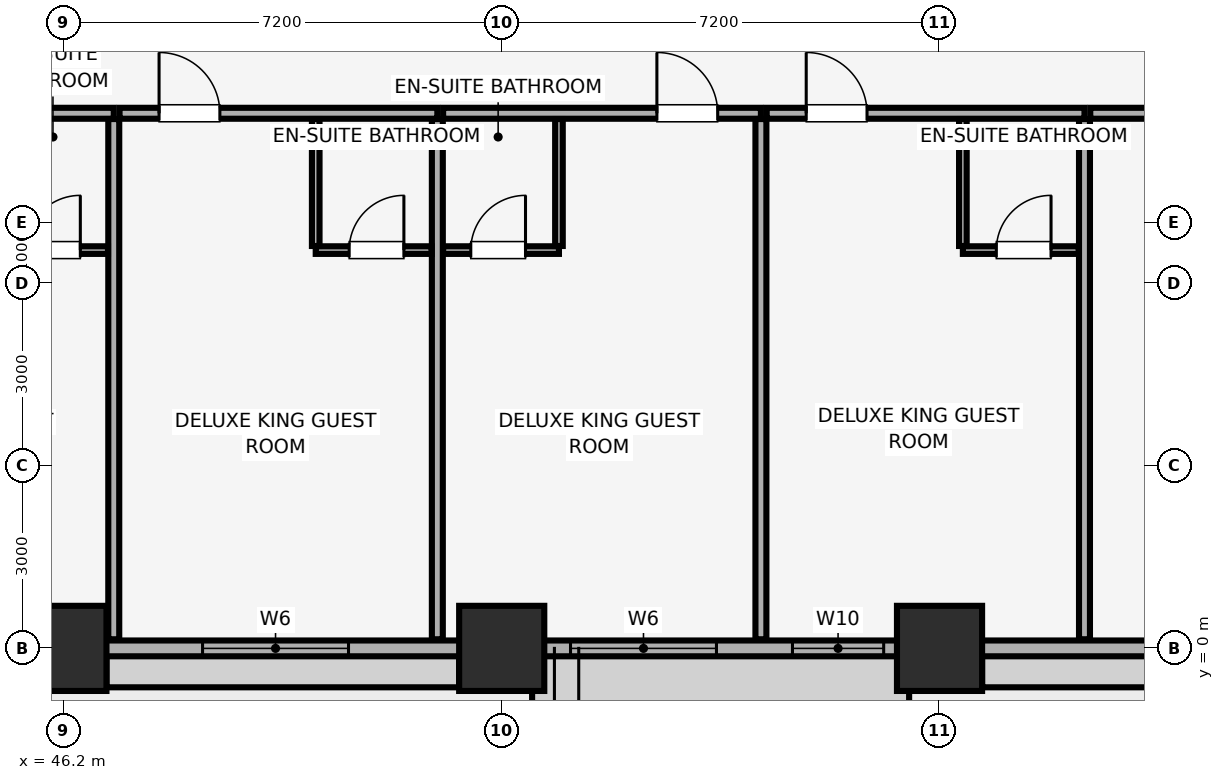
"""IFC4 building model, lengths in metres.
Left out: names, types, materials, properties, quantities, classifications, styles, units other than length and angle.
Written with IfcOpenShell. Run it as: python <this file> out.ifc"""

import sys

from ifc_helpers import new_model, si_unit, direction, frame, frame_2d, origin, origin_2d, place, context, subcontext, project, spatial, rectangle, extrude, element, fill, save


model = new_model("IFC4")
c1 = context("Model", 3, precision=1e-05, world=origin(), true_north=direction((0.0, 1.0)))
c2 = subcontext(c1, "Body", "Model", "MODEL_VIEW")
j1 = project(units=[si_unit("LENGTHUNIT", "METRE"), si_unit("PLANEANGLEUNIT", "RADIAN")], contexts=[c1])
p1 = place(None, origin())
s1 = spatial("IfcSite", under=j1, at=p1, CompositionType="ELEMENT")
p2 = place(p1, origin())
s2 = spatial("IfcBuilding", under=s1, at=p2, CompositionType="ELEMENT")
p3 = place(p2, frame((0.0, 0.0, 31.4)))
s3 = spatial("IfcBuildingStorey", under=s2, at=p3, CompositionType="ELEMENT", Elevation=31.4)
for number, where, z_axis, x_axis in (
    (1, (46.2, 0.0, 0.0), (0.0, 0.0, 1.0), (1.0, 0.0, 0.0)),
    (2, (53.4, 0.0, 0.0), (0.0, 0.0, 1.0), (1.0, 0.0, 0.0)),
    (3, (60.6, 0.0, 0.0), (0.0, 0.0, 1.0), (1.0, 0.0, 0.0)),
):
    element("IfcColumn", number, at=place(p3, frame(where, z_axis=z_axis, x_axis=x_axis)), inside=s3, PredefinedType="COLUMN", context=c2, shape_type="SweptSolid", body=[
        extrude(rectangle(XDim=1.4, YDim=1.4, at=origin_2d()), origin(), (0.0, 0.0, 1.0), 3.51),
    ])
p4 = place(p3, frame((4.2, 0.0, 0.0), z_axis=(0.0, 0.0, 1.0), x_axis=(1.0, 0.0, 0.0)))
e4 = element("IfcWall", 4, at=p4, inside=s3, PredefinedType="SOLIDWALL", context=c2, shape_type="SweptSolid", body=[
    extrude(rectangle(XDim=75.6, YDim=0.26, at=frame_2d((37.8, 0.0))), origin(), (0.0, 0.0, 1.0), 2.56),
])
p5 = place(p4, frame((13.517, 0.0, 0.0)))
e5 = element("IfcOpeningElement", 5, at=p5, cuts=e4, PredefinedType="OPENING", context=c2, shape_type="SweptSolid", body=[
    extrude(rectangle(XDim=1.1, YDim=2.15, at=frame_2d((0.55, 1.075))), frame((0.0, 0.14, 0.0), z_axis=(0.0, -1.0, 0.0), x_axis=(1.0, 0.0, 0.0)), (0.0, 0.0, 1.0), 0.28),
])
p6 = place(p4, frame((28.183, 0.0, 0.0)))
e6 = element("IfcOpeningElement", 6, at=p6, cuts=e4, PredefinedType="OPENING", context=c2, shape_type="SweptSolid", body=[
    extrude(rectangle(XDim=1.1, YDim=2.15, at=frame_2d((0.55, 1.075))), frame((0.0, 0.14, 0.0), z_axis=(0.0, -1.0, 0.0), x_axis=(1.0, 0.0, 0.0)), (0.0, 0.0, 1.0), 0.28),
])
p7 = place(p4, frame((60.983, 0.0, 0.0)))
e7 = element("IfcOpeningElement", 7, at=p7, cuts=e4, PredefinedType="OPENING", context=c2, shape_type="SweptSolid", body=[
    extrude(rectangle(XDim=1.1, YDim=2.15, at=frame_2d((0.55, 1.075))), frame((0.0, 0.14, 0.0), z_axis=(0.0, -1.0, 0.0), x_axis=(1.0, 0.0, 0.0)), (0.0, 0.0, 1.0), 0.28),
])
p8 = place(p4, frame((1.035, 0.0, 0.85)))
e8 = element("IfcOpeningElement", 8, at=p8, cuts=e4, PredefinedType="OPENING", context=c2, shape_type="SweptSolid", body=[
    extrude(rectangle(XDim=2.4, YDim=1.5, at=frame_2d((1.2, 0.75))), frame((0.0, 0.14, 0.0), z_axis=(0.0, -1.0, 0.0), x_axis=(1.0, 0.0, 0.0)), (0.0, 0.0, 1.0), 0.28),
])
p9 = place(p4, frame((7.031, 0.0, 0.85)))
e9 = element("IfcOpeningElement", 9, at=p9, cuts=e4, PredefinedType="OPENING", context=c2, shape_type="SweptSolid", body=[
    extrude(rectangle(XDim=2.4, YDim=1.5, at=frame_2d((1.2, 0.75))), frame((0.0, 0.14, 0.0), z_axis=(0.0, -1.0, 0.0), x_axis=(1.0, 0.0, 0.0)), (0.0, 0.0, 1.0), 0.28),
])
p10 = place(p4, frame((16.757, 0.0, 0.85)))
e10 = element("IfcOpeningElement", 10, at=p10, cuts=e4, PredefinedType="OPENING", context=c2, shape_type="SweptSolid", body=[
    extrude(rectangle(XDim=1.5, YDim=1.4, at=frame_2d((0.75, 0.7))), frame((0.0, 0.14, 0.0), z_axis=(0.0, -1.0, 0.0), x_axis=(1.0, 0.0, 0.0)), (0.0, 0.0, 1.0), 0.28),
])
p11 = place(p4, frame((22.567, 0.0, 0.85)))
e11 = element("IfcOpeningElement", 11, at=p11, cuts=e4, PredefinedType="OPENING", context=c2, shape_type="SweptSolid", body=[
    extrude(rectangle(XDim=2.4, YDim=1.5, at=frame_2d((1.2, 0.75))), frame((0.0, 0.14, 0.0), z_axis=(0.0, -1.0, 0.0), x_axis=(1.0, 0.0, 0.0)), (0.0, 0.0, 1.0), 0.28),
])
p12 = place(p4, frame((30.065, 0.0, 0.85)))
e12 = element("IfcOpeningElement", 12, at=p12, cuts=e4, PredefinedType="OPENING", context=c2, shape_type="SweptSolid", body=[
    extrude(rectangle(XDim=1.5, YDim=1.4, at=frame_2d((0.75, 0.7))), frame((0.0, 0.14, 0.0), z_axis=(0.0, -1.0, 0.0), x_axis=(1.0, 0.0, 0.0)), (0.0, 0.0, 1.0), 0.28),
])
p13 = place(p4, frame((34.55, 0.0, 0.85)))
e13 = element("IfcOpeningElement", 13, at=p13, cuts=e4, PredefinedType="OPENING", context=c2, shape_type="SweptSolid", body=[
    extrude(rectangle(XDim=2.4, YDim=1.5, at=frame_2d((1.2, 0.75))), frame((0.0, 0.14, 0.0), z_axis=(0.0, -1.0, 0.0), x_axis=(1.0, 0.0, 0.0)), (0.0, 0.0, 1.0), 0.28),
])
p14 = place(p4, frame((38.35, 0.0, 0.85)))
e14 = element("IfcOpeningElement", 14, at=p14, cuts=e4, PredefinedType="OPENING", context=c2, shape_type="SweptSolid", body=[
    extrude(rectangle(XDim=2.4, YDim=1.5, at=frame_2d((1.2, 0.75))), frame((0.0, 0.14, 0.0), z_axis=(0.0, -1.0, 0.0), x_axis=(1.0, 0.0, 0.0)), (0.0, 0.0, 1.0), 0.28),
])
p15 = place(p4, frame((44.281, 0.0, 0.85)))
e15 = element("IfcOpeningElement", 15, at=p15, cuts=e4, PredefinedType="OPENING", context=c2, shape_type="SweptSolid", body=[
    extrude(rectangle(XDim=2.4, YDim=1.5, at=frame_2d((1.2, 0.75))), frame((0.0, 0.14, 0.0), z_axis=(0.0, -1.0, 0.0), x_axis=(1.0, 0.0, 0.0)), (0.0, 0.0, 1.0), 0.28),
])
p16 = place(p4, frame((50.332, 0.0, 0.85)))
e16 = element("IfcOpeningElement", 16, at=p16, cuts=e4, PredefinedType="OPENING", context=c2, shape_type="SweptSolid", body=[
    extrude(rectangle(XDim=2.4, YDim=1.5, at=frame_2d((1.2, 0.75))), frame((0.0, 0.14, 0.0), z_axis=(0.0, -1.0, 0.0), x_axis=(1.0, 0.0, 0.0)), (0.0, 0.0, 1.0), 0.28),
])
p17 = place(p4, frame((53.981, 0.0, 0.85)))
e17 = element("IfcOpeningElement", 17, at=p17, cuts=e4, PredefinedType="OPENING", context=c2, shape_type="SweptSolid", body=[
    extrude(rectangle(XDim=1.5, YDim=1.4, at=frame_2d((0.75, 0.7))), frame((0.0, 0.14, 0.0), z_axis=(0.0, -1.0, 0.0), x_axis=(1.0, 0.0, 0.0)), (0.0, 0.0, 1.0), 0.28),
])
p18 = place(p4, frame((64.759, 0.0, 0.85)))
e18 = element("IfcOpeningElement", 18, at=p18, cuts=e4, PredefinedType="OPENING", context=c2, shape_type="SweptSolid", body=[
    extrude(rectangle(XDim=1.5, YDim=1.4, at=frame_2d((0.75, 0.7))), frame((0.0, 0.14, 0.0), z_axis=(0.0, -1.0, 0.0), x_axis=(1.0, 0.0, 0.0)), (0.0, 0.0, 1.0), 0.28),
])
p19 = place(p4, frame((67.509, 0.0, 0.85)))
e19 = element("IfcOpeningElement", 19, at=p19, cuts=e4, PredefinedType="OPENING", context=c2, shape_type="SweptSolid", body=[
    extrude(rectangle(XDim=2.4, YDim=1.5, at=frame_2d((1.2, 0.75))), frame((0.0, 0.14, 0.0), z_axis=(0.0, -1.0, 0.0), x_axis=(1.0, 0.0, 0.0)), (0.0, 0.0, 1.0), 0.28),
])
p20 = place(p4, frame((72.165, 0.0, 0.85)))
e20 = element("IfcOpeningElement", 20, at=p20, cuts=e4, PredefinedType="OPENING", context=c2, shape_type="SweptSolid", body=[
    extrude(rectangle(XDim=2.4, YDim=1.5, at=frame_2d((1.2, 0.75))), frame((0.0, 0.14, 0.0), z_axis=(0.0, -1.0, 0.0), x_axis=(1.0, 0.0, 0.0)), (0.0, 0.0, 1.0), 0.28),
])
p21 = place(p3, frame((41.794, 8.8, 0.0), z_axis=(0.0, 0.0, 1.0), x_axis=(1.0, 0.0, 0.0)))
e21 = element("IfcWall", 21, at=p21, inside=s3, PredefinedType="PARTITIONING", context=c2, shape_type="SweptSolid", body=[
    extrude(rectangle(XDim=5.226, YDim=0.18, at=frame_2d((2.613, 0.0))), origin(), (0.0, 0.0, 1.0), 3.51),
])
p22 = place(p21, frame((0.65, 0.0, 0.0)))
e22 = element("IfcOpeningElement", 22, at=p22, cuts=e21, PredefinedType="OPENING", context=c2, shape_type="SweptSolid", body=[
    extrude(rectangle(XDim=1.0, YDim=2.15, at=frame_2d((0.5, 1.075))), frame((0.0, 0.1, 0.0), z_axis=(0.0, -1.0, 0.0), x_axis=(1.0, 0.0, 0.0)), (0.0, 0.0, 1.0), 0.2),
])
p23 = place(p3, frame((47.02, 0.15, 0.0), z_axis=(0.0, 0.0, 1.0), x_axis=(0.0, 1.0, 0.0)))
e23 = element("IfcWall", 23, at=p23, inside=s3, PredefinedType="PARTITIONING", context=c2, shape_type="SweptSolid", body=[
    extrude(rectangle(XDim=8.555, YDim=0.18, at=frame_2d((4.278, 0.0))), origin(), (0.0, 0.0, 1.0), 3.51),
])
p24 = place(p3, frame((45.02, 6.55, 0.0), z_axis=(0.0, 0.0, 1.0), x_axis=(1.0, 0.0, 0.0)))
e24 = element("IfcWall", 24, at=p24, inside=s3, PredefinedType="PARTITIONING", context=c2, shape_type="SweptSolid", body=[
    extrude(rectangle(XDim=1.905, YDim=0.125, at=frame_2d((0.953, 0.0))), origin(), (0.0, 0.0, 1.0), 3.51),
])
p25 = place(p24, frame((0.55, 0.0, 0.0)))
e25 = element("IfcOpeningElement", 25, at=p25, cuts=e24, PredefinedType="OPENING", context=c2, shape_type="SweptSolid", body=[
    extrude(rectangle(XDim=0.9, YDim=2.1, at=frame_2d((0.45, 1.05))), frame((0.0, 0.073, 0.0), z_axis=(0.0, -1.0, 0.0), x_axis=(1.0, 0.0, 0.0)), (0.0, 0.0, 1.0), 0.145),
])
p26 = place(p3, frame((47.115, 8.8, 0.0), z_axis=(0.0, 0.0, 1.0), x_axis=(1.0, 0.0, 0.0)))
e26 = element("IfcWall", 26, at=p26, inside=s3, PredefinedType="PARTITIONING", context=c2, shape_type="SweptSolid", body=[
    extrude(rectangle(XDim=5.226, YDim=0.18, at=frame_2d((2.613, 0.0))), origin(), (0.0, 0.0, 1.0), 3.51),
])
p27 = place(p26, frame((0.65, 0.0, 0.0)))
e27 = element("IfcOpeningElement", 27, at=p27, cuts=e26, PredefinedType="OPENING", context=c2, shape_type="SweptSolid", body=[
    extrude(rectangle(XDim=1.0, YDim=2.15, at=frame_2d((0.5, 1.075))), frame((0.0, 0.1, 0.0), z_axis=(0.0, -1.0, 0.0), x_axis=(1.0, 0.0, 0.0)), (0.0, 0.0, 1.0), 0.2),
])
p28 = place(p3, frame((52.341, 0.15, 0.0), z_axis=(0.0, 0.0, 1.0), x_axis=(0.0, 1.0, 0.0)))
e28 = element("IfcWall", 28, at=p28, inside=s3, PredefinedType="PARTITIONING", context=c2, shape_type="SweptSolid", body=[
    extrude(rectangle(XDim=8.555, YDim=0.18, at=frame_2d((4.278, 0.0))), origin(), (0.0, 0.0, 1.0), 3.51),
])
p29 = place(p3, frame((50.341, 6.55, 0.0), z_axis=(0.0, 0.0, 1.0), x_axis=(1.0, 0.0, 0.0)))
e29 = element("IfcWall", 29, at=p29, inside=s3, PredefinedType="PARTITIONING", context=c2, shape_type="SweptSolid", body=[
    extrude(rectangle(XDim=1.905, YDim=0.125, at=frame_2d((0.953, 0.0))), origin(), (0.0, 0.0, 1.0), 3.51),
])
p30 = place(p29, frame((0.55, 0.0, 0.0)))
e30 = element("IfcOpeningElement", 30, at=p30, cuts=e29, PredefinedType="OPENING", context=c2, shape_type="SweptSolid", body=[
    extrude(rectangle(XDim=0.9, YDim=2.1, at=frame_2d((0.45, 1.05))), frame((0.0, 0.073, 0.0), z_axis=(0.0, -1.0, 0.0), x_axis=(1.0, 0.0, 0.0)), (0.0, 0.0, 1.0), 0.145),
])
p31 = place(p3, frame((50.341, 6.617, 0.0), z_axis=(0.0, 0.0, 1.0), x_axis=(0.0, 1.0, 0.0)))
e31 = element("IfcWall", 31, at=p31, inside=s3, PredefinedType="PARTITIONING", context=c2, shape_type="SweptSolid", body=[
    extrude(rectangle(XDim=2.088, YDim=0.125, at=frame_2d((1.044, 0.0))), origin(), (0.0, 0.0, 1.0), 3.51),
])
p32 = place(p3, frame((52.436, 8.8, 0.0), z_axis=(0.0, 0.0, 1.0), x_axis=(1.0, 0.0, 0.0)))
e32 = element("IfcWall", 32, at=p32, inside=s3, PredefinedType="PARTITIONING", context=c2, shape_type="SweptSolid", body=[
    extrude(rectangle(XDim=5.226, YDim=0.18, at=frame_2d((2.613, 0.0))), origin(), (0.0, 0.0, 1.0), 3.51),
])
p33 = place(p32, frame((3.516, 0.0, 0.0)))
e33 = element("IfcOpeningElement", 33, at=p33, cuts=e32, PredefinedType="OPENING", context=c2, shape_type="SweptSolid", body=[
    extrude(rectangle(XDim=1.0, YDim=2.15, at=frame_2d((0.5, 1.075))), frame((0.0, 0.1, 0.0), z_axis=(0.0, -1.0, 0.0), x_axis=(1.0, 0.0, 0.0)), (0.0, 0.0, 1.0), 0.2),
])
p34 = place(p3, frame((57.663, 0.15, 0.0), z_axis=(0.0, 0.0, 1.0), x_axis=(0.0, 1.0, 0.0)))
e34 = element("IfcWall", 34, at=p34, inside=s3, PredefinedType="PARTITIONING", context=c2, shape_type="SweptSolid", body=[
    extrude(rectangle(XDim=8.555, YDim=0.18, at=frame_2d((4.278, 0.0))), origin(), (0.0, 0.0, 1.0), 3.51),
])
p35 = place(p3, frame((52.436, 6.55, 0.0), z_axis=(0.0, 0.0, 1.0), x_axis=(1.0, 0.0, 0.0)))
e35 = element("IfcWall", 35, at=p35, inside=s3, PredefinedType="PARTITIONING", context=c2, shape_type="SweptSolid", body=[
    extrude(rectangle(XDim=1.905, YDim=0.125, at=frame_2d((0.953, 0.0))), origin(), (0.0, 0.0, 1.0), 3.51),
])
p36 = place(p35, frame((0.455, 0.0, 0.0)))
e36 = element("IfcOpeningElement", 36, at=p36, cuts=e35, PredefinedType="OPENING", context=c2, shape_type="SweptSolid", body=[
    extrude(rectangle(XDim=0.9, YDim=2.1, at=frame_2d((0.45, 1.05))), frame((0.0, 0.073, 0.0), z_axis=(0.0, -1.0, 0.0), x_axis=(1.0, 0.0, 0.0)), (0.0, 0.0, 1.0), 0.145),
])
p37 = place(p3, frame((54.341, 6.617, 0.0), z_axis=(0.0, 0.0, 1.0), x_axis=(0.0, 1.0, 0.0)))
e37 = element("IfcWall", 37, at=p37, inside=s3, PredefinedType="PARTITIONING", context=c2, shape_type="SweptSolid", body=[
    extrude(rectangle(XDim=2.088, YDim=0.125, at=frame_2d((1.044, 0.0))), origin(), (0.0, 0.0, 1.0), 3.51),
])
p38 = place(p3, frame((57.758, 8.8, 0.0), z_axis=(0.0, 0.0, 1.0), x_axis=(1.0, 0.0, 0.0)))
e38 = element("IfcWall", 38, at=p38, inside=s3, PredefinedType="PARTITIONING", context=c2, shape_type="SweptSolid", body=[
    extrude(rectangle(XDim=5.226, YDim=0.18, at=frame_2d((2.613, 0.0))), origin(), (0.0, 0.0, 1.0), 3.51),
])
p39 = place(p38, frame((0.65, 0.0, 0.0)))
e39 = element("IfcOpeningElement", 39, at=p39, cuts=e38, PredefinedType="OPENING", context=c2, shape_type="SweptSolid", body=[
    extrude(rectangle(XDim=1.0, YDim=2.15, at=frame_2d((0.5, 1.075))), frame((0.0, 0.1, 0.0), z_axis=(0.0, -1.0, 0.0), x_axis=(1.0, 0.0, 0.0)), (0.0, 0.0, 1.0), 0.2),
])
p40 = place(p3, frame((62.984, 0.15, 0.0), z_axis=(0.0, 0.0, 1.0), x_axis=(0.0, 1.0, 0.0)))
e40 = element("IfcWall", 40, at=p40, inside=s3, PredefinedType="PARTITIONING", context=c2, shape_type="SweptSolid", body=[
    extrude(rectangle(XDim=8.555, YDim=0.18, at=frame_2d((4.278, 0.0))), origin(), (0.0, 0.0, 1.0), 3.51),
])
p41 = place(p3, frame((60.984, 6.55, 0.0), z_axis=(0.0, 0.0, 1.0), x_axis=(1.0, 0.0, 0.0)))
e41 = element("IfcWall", 41, at=p41, inside=s3, PredefinedType="PARTITIONING", context=c2, shape_type="SweptSolid", body=[
    extrude(rectangle(XDim=1.905, YDim=0.125, at=frame_2d((0.953, 0.0))), origin(), (0.0, 0.0, 1.0), 3.51),
])
p42 = place(p41, frame((0.55, 0.0, 0.0)))
e42 = element("IfcOpeningElement", 42, at=p42, cuts=e41, PredefinedType="OPENING", context=c2, shape_type="SweptSolid", body=[
    extrude(rectangle(XDim=0.9, YDim=2.1, at=frame_2d((0.45, 1.05))), frame((0.0, 0.073, 0.0), z_axis=(0.0, -1.0, 0.0), x_axis=(1.0, 0.0, 0.0)), (0.0, 0.0, 1.0), 0.145),
])
p43 = place(p3, frame((60.984, 6.617, 0.0), z_axis=(0.0, 0.0, 1.0), x_axis=(0.0, 1.0, 0.0)))
e43 = element("IfcWall", 43, at=p43, inside=s3, PredefinedType="PARTITIONING", context=c2, shape_type="SweptSolid", body=[
    extrude(rectangle(XDim=2.088, YDim=0.125, at=frame_2d((1.044, 0.0))), origin(), (0.0, 0.0, 1.0), 3.51),
])
p44 = place(p3, frame((63.079, 8.8, 0.0), z_axis=(0.0, 0.0, 1.0), x_axis=(1.0, 0.0, 0.0)))
e44 = element("IfcWall", 44, at=p44, inside=s3, PredefinedType="PARTITIONING", context=c2, shape_type="SweptSolid", body=[
    extrude(rectangle(XDim=8.138, YDim=0.18, at=frame_2d((4.069, 0.0))), origin(), (0.0, 0.0, 1.0), 3.51),
])
p45 = place(p44, frame((1.423, 0.0, 0.0)))
e45 = element("IfcOpeningElement", 45, at=p45, cuts=e44, PredefinedType="OPENING", context=c2, shape_type="SweptSolid", body=[
    extrude(rectangle(XDim=1.0, YDim=2.15, at=frame_2d((0.5, 1.075))), frame((0.0, 0.1, 0.0), z_axis=(0.0, -1.0, 0.0), x_axis=(1.0, 0.0, 0.0)), (0.0, 0.0, 1.0), 0.2),
])
p46 = place(p15, origin())
e46 = element("IfcWindow", 46, at=p46, inside=s3, PartitioningType="SINGLE_PANEL", PredefinedType="WINDOW", context=c2, shape_type="SweptSolid", body=[
    extrude(rectangle(XDim=2.4, YDim=1.5, at=frame_2d((1.2, 0.75))), frame((0.0, 0.03, 0.0), z_axis=(0.0, -1.0, 0.0), x_axis=(1.0, 0.0, 0.0)), (0.0, 0.0, 1.0), 0.06),
])
fill(e15, e46)
p47 = place(p16, origin())
e47 = element("IfcWindow", 47, at=p47, inside=s3, PartitioningType="SINGLE_PANEL", PredefinedType="WINDOW", context=c2, shape_type="SweptSolid", body=[
    extrude(rectangle(XDim=2.4, YDim=1.5, at=frame_2d((1.2, 0.75))), frame((0.0, 0.03, 0.0), z_axis=(0.0, -1.0, 0.0), x_axis=(1.0, 0.0, 0.0)), (0.0, 0.0, 1.0), 0.06),
])
fill(e16, e47)
p48 = place(p17, origin())
e48 = element("IfcWindow", 48, at=p48, inside=s3, PartitioningType="SINGLE_PANEL", PredefinedType="WINDOW", context=c2, shape_type="SweptSolid", body=[
    extrude(rectangle(XDim=1.5, YDim=1.4, at=frame_2d((0.75, 0.7))), frame((0.0, 0.03, 0.0), z_axis=(0.0, -1.0, 0.0), x_axis=(1.0, 0.0, 0.0)), (0.0, 0.0, 1.0), 0.06),
])
fill(e17, e48)
p49 = place(p25, origin())
e49 = element("IfcDoor", 49, at=p49, inside=s3, OperationType="SINGLE_SWING_RIGHT", PredefinedType="DOOR", context=c2, shape_type="SweptSolid", body=[
    extrude(rectangle(XDim=0.9, YDim=2.1, at=frame_2d((0.45, 1.05))), frame((0.0, 0.025, 0.0), z_axis=(0.0, -1.0, 0.0), x_axis=(1.0, 0.0, 0.0)), (0.0, 0.0, 1.0), 0.05),
])
fill(e25, e49)
p50 = place(p27, origin())
e50 = element("IfcDoor", 50, at=p50, inside=s3, OperationType="SINGLE_SWING_LEFT", PredefinedType="DOOR", context=c2, shape_type="SweptSolid", body=[
    extrude(rectangle(XDim=1.0, YDim=2.15, at=frame_2d((0.5, 1.075))), frame((0.0, 0.025, 0.0), z_axis=(0.0, -1.0, 0.0), x_axis=(1.0, 0.0, 0.0)), (0.0, 0.0, 1.0), 0.05),
])
fill(e27, e50)
p51 = place(p30, origin())
e51 = element("IfcDoor", 51, at=p51, inside=s3, OperationType="SINGLE_SWING_RIGHT", PredefinedType="DOOR", context=c2, shape_type="SweptSolid", body=[
    extrude(rectangle(XDim=0.9, YDim=2.1, at=frame_2d((0.45, 1.05))), frame((0.0, 0.025, 0.0), z_axis=(0.0, -1.0, 0.0), x_axis=(1.0, 0.0, 0.0)), (0.0, 0.0, 1.0), 0.05),
])
fill(e30, e51)
p52 = place(p33, origin())
e52 = element("IfcDoor", 52, at=p52, inside=s3, OperationType="SINGLE_SWING_LEFT", PredefinedType="DOOR", context=c2, shape_type="SweptSolid", body=[
    extrude(rectangle(XDim=1.0, YDim=2.15, at=frame_2d((0.5, 1.075))), frame((0.0, 0.025, 0.0), z_axis=(0.0, -1.0, 0.0), x_axis=(1.0, 0.0, 0.0)), (0.0, 0.0, 1.0), 0.05),
])
fill(e33, e52)
p53 = place(p36, origin())
e53 = element("IfcDoor", 53, at=p53, inside=s3, OperationType="SINGLE_SWING_RIGHT", PredefinedType="DOOR", context=c2, shape_type="SweptSolid", body=[
    extrude(rectangle(XDim=0.9, YDim=2.1, at=frame_2d((0.45, 1.05))), frame((0.0, 0.025, 0.0), z_axis=(0.0, -1.0, 0.0), x_axis=(1.0, 0.0, 0.0)), (0.0, 0.0, 1.0), 0.05),
])
fill(e36, e53)
p54 = place(p39, origin())
e54 = element("IfcDoor", 54, at=p54, inside=s3, OperationType="SINGLE_SWING_LEFT", PredefinedType="DOOR", context=c2, shape_type="SweptSolid", body=[
    extrude(rectangle(XDim=1.0, YDim=2.15, at=frame_2d((0.5, 1.075))), frame((0.0, 0.025, 0.0), z_axis=(0.0, -1.0, 0.0), x_axis=(1.0, 0.0, 0.0)), (0.0, 0.0, 1.0), 0.05),
])
fill(e39, e54)
p55 = place(p42, origin())
e55 = element("IfcDoor", 55, at=p55, inside=s3, OperationType="SINGLE_SWING_RIGHT", PredefinedType="DOOR", context=c2, shape_type="SweptSolid", body=[
    extrude(rectangle(XDim=0.9, YDim=2.1, at=frame_2d((0.45, 1.05))), frame((0.0, 0.025, 0.0), z_axis=(0.0, -1.0, 0.0), x_axis=(1.0, 0.0, 0.0)), (0.0, 0.0, 1.0), 0.05),
])
fill(e42, e55)
save(model, sys.argv[1])
